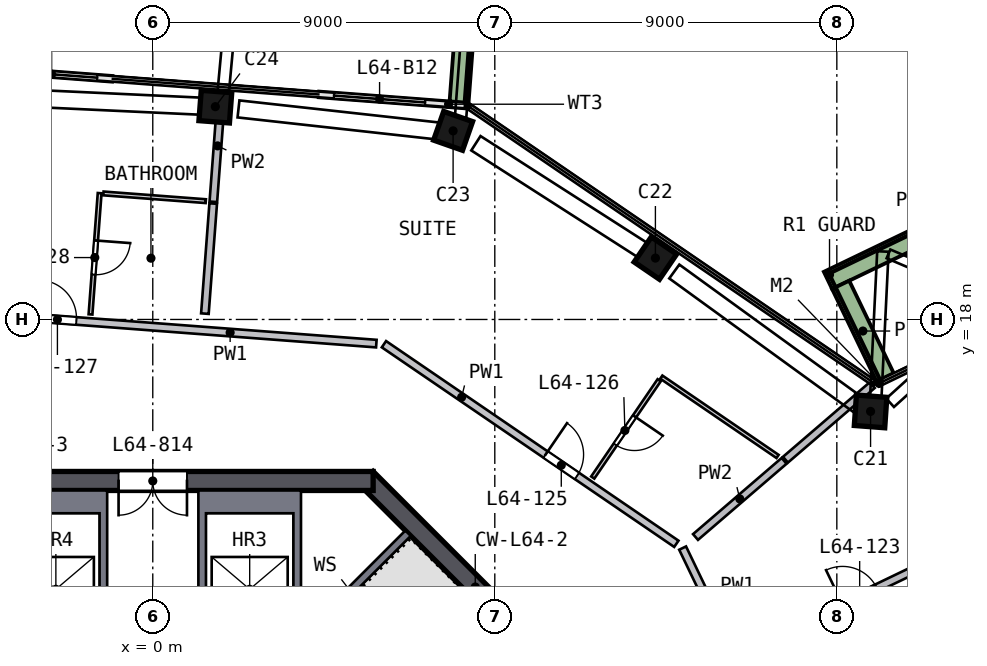
"""IFC4 building model, lengths in metres.
Left out: names, types, materials, properties, quantities, classifications, styles, units other than length and angle.
Written with IfcOpenShell. Run it as: python <this file> out.ifc"""

import sys

from ifc_helpers import new_model, si_unit, direction, frame, frame_2d, origin, origin_2d, place, context, subcontext, project, spatial, polyline, rectangle, outline, extrude, element, fill, save


model = new_model("IFC4")
c1 = context("Model", 3, precision=1e-05, world=origin(), true_north=direction((0.0, 1.0)))
c2 = subcontext(c1, "Body", "Model", "MODEL_VIEW")
j1 = project(units=[si_unit("LENGTHUNIT", "METRE"), si_unit("PLANEANGLEUNIT", "RADIAN")], contexts=[c1])
p1 = place(None, origin())
s1 = spatial("IfcSite", under=j1, at=p1, CompositionType="ELEMENT")
p2 = place(p1, origin())
s2 = spatial("IfcBuilding", under=s1, at=p2, CompositionType="ELEMENT")
p3 = place(p2, frame((0.0, 0.0, 259.5)))
s3 = spatial("IfcBuildingStorey", under=s2, at=p3, CompositionType="ELEMENT", Elevation=259.5)
p4 = place(p3, frame((18.978, 15.472, 0.0), z_axis=(-0.074360285, 0.089636475, 0.99319477), x_axis=(0.994413734, -0.068151324, 0.08060225)))
e1 = element("IfcColumn", 1, at=p4, inside=s3, PredefinedType="COLUMN", context=c2, shape_type="SweptSolid", body=[
    extrude(rectangle(XDim=0.8, YDim=0.8, at=origin_2d()), origin(), (0.0, 0.0, 1.0), 3.021),
])
p5 = place(p3, frame((13.339, 19.54, 0.0), z_axis=(-0.093477865, 0.062668984, 0.993647064), x_axis=(-0.820609145, 0.560299936, -0.11253716)))
e2 = element("IfcColumn", 2, at=p5, inside=s3, PredefinedType="COLUMN", context=c2, shape_type="SweptSolid", body=[
    extrude(rectangle(XDim=0.8, YDim=0.8, at=origin_2d()), origin(), (0.0, 0.0, 1.0), 3.019),
])
p6 = place(p3, frame((8.035, 22.918, 0.0), z_axis=(-0.109369959, 0.037265005, 0.993302336), x_axis=(0.937470498, -0.328328413, 0.115540119)))
e3 = element("IfcColumn", 3, at=p6, inside=s3, PredefinedType="COLUMN", context=c2, shape_type="SweptSolid", body=[
    extrude(rectangle(XDim=0.8, YDim=0.8, at=origin_2d()), origin(), (0.0, 0.0, 1.0), 3.02),
])
p7 = place(p3, frame((1.782, 23.591, 0.0), z_axis=(-0.112238709, 0.007601181, 0.9936522), x_axis=(-0.990776389, 0.075549588, -0.112491804)))
e4 = element("IfcColumn", 4, at=p7, inside=s3, PredefinedType="COLUMN", context=c2, shape_type="SweptSolid", body=[
    extrude(rectangle(XDim=0.8, YDim=0.8, at=origin_2d()), origin(), (0.0, 0.0, 1.0), 3.019),
])
p8 = place(p3, frame((13.823, 5.622, 0.0), z_axis=(0.0, 0.0, 1.0), x_axis=(-0.707106781, 0.707106781, 0.0)))
e5 = element("IfcWall", 5, at=p8, inside=s3, PredefinedType="SHEAR", context=c2, shape_type="SweptSolid", body=[
    extrude(rectangle(XDim=11.598, YDim=0.5, at=frame_2d((5.799, 0.0))), origin(), (0.0, 0.0, 1.0), 3.5),
])
p9 = place(p8, frame((2.099, 0.0, 0.0)))
e6 = element("IfcOpeningElement", 6, at=p9, cuts=e5, PredefinedType="OPENING", context=c2, shape_type="SweptSolid", body=[
    extrude(rectangle(XDim=1.2, YDim=2.1, at=frame_2d((0.6, 1.05))), frame((0.0, 0.26, 0.0), z_axis=(0.0, -1.0, 0.0), x_axis=(1.0, 0.0, 0.0)), (0.0, 0.0, 1.0), 0.52),
])
p10 = place(p3, frame((5.799, 13.75, 0.0), z_axis=(0.0, 0.0, 1.0), x_axis=(-1.0, 0.0, 0.0)))
e7 = element("IfcWall", 7, at=p10, inside=s3, PredefinedType="SHEAR", context=c2, shape_type="SweptSolid", body=[
    extrude(rectangle(XDim=11.598, YDim=0.5, at=frame_2d((5.799, 0.0))), origin(), (0.0, 0.0, 1.0), 3.5),
])
p11 = place(p10, frame((4.899, 0.0, 0.0)))
e8 = element("IfcOpeningElement", 8, at=p11, cuts=e7, PredefinedType="OPENING", context=c2, shape_type="SweptSolid", body=[
    extrude(rectangle(XDim=1.8, YDim=2.1, at=frame_2d((0.9, 1.05))), frame((0.0, 0.26, 0.0), z_axis=(0.0, -1.0, 0.0), x_axis=(1.0, 0.0, 0.0)), (0.0, 0.0, 1.0), 0.52),
])
p12 = place(p3, frame((8.203, 23.633, 0.0), z_axis=(0.0, 0.0, 1.0), x_axis=(-0.99716043, 0.075306552, 0.0)))
e9 = element("IfcWall", 9, at=p12, inside=s3, PredefinedType="SOLIDWALL", context=c2, shape_type="SweptSolid", body=[
    extrude(rectangle(XDim=3.842, YDim=0.15, at=frame_2d((1.921, 0.0))), origin(), (0.0, 0.0, 1.0), 2.935),
])
p13 = place(p12, frame((1.042, 0.0, 0.0)))
e10 = element("IfcOpeningElement", 10, at=p13, cuts=e9, PredefinedType="OPENING", context=c2, shape_type="SweptSolid", body=[
    extrude(rectangle(XDim=2.4, YDim=2.4, at=frame_2d((1.2, 1.2))), frame((0.0, 0.085, 0.0), z_axis=(0.0, -1.0, 0.0), x_axis=(1.0, 0.0, 0.0)), (0.0, 0.0, 1.0), 0.17),
])
p14 = place(p3, frame((-1.066, 24.333, 0.0), z_axis=(0.0, 0.0, 1.0), x_axis=(-0.997159679, 0.075316491, 0.0)))
e11 = element("IfcWall", 11, at=p14, inside=s3, PredefinedType="SOLIDWALL", context=c2, shape_type="SweptSolid", body=[
    extrude(rectangle(XDim=3.504, YDim=0.15, at=frame_2d((1.752, 0.0))), origin(), (0.0, 0.0, 1.0), 2.935),
])
p15 = place(p14, frame((0.4, 0.0, 0.0)))
e12 = element("IfcOpeningElement", 12, at=p15, cuts=e11, PredefinedType="OPENING", context=c2, shape_type="SweptSolid", body=[
    extrude(rectangle(XDim=2.4, YDim=2.4, at=frame_2d((1.2, 1.2))), frame((0.0, 0.085, 0.0), z_axis=(0.0, -1.0, 0.0), x_axis=(1.0, 0.0, 0.0)), (0.0, 0.0, 1.0), 0.17),
])
p16 = place(p3, frame((23.174, 21.629, 0.0), z_axis=(0.0, 0.0, 1.0), x_axis=(-0.901221864, -0.433357994, 0.0)))
e13 = element("IfcWall", 13, at=p16, inside=s3, PredefinedType="SOLIDWALL", context=c2, shape_type="SweptSolid", body=[
    extrude(rectangle(XDim=6.0, YDim=0.5, at=frame_2d((3.0, 0.0))), origin(), (0.0, 0.0, 1.0), 0.7),
])
p17 = place(p3, frame((18.101, 18.912, 0.0), z_axis=(0.0, 0.0, 1.0), x_axis=(0.433374971, -0.901213701, 0.0)))
e14 = element("IfcWall", 14, at=p17, inside=s3, PredefinedType="SOLIDWALL", context=c2, shape_type="SweptSolid", body=[
    extrude(rectangle(XDim=2.699, YDim=0.5, at=frame_2d((1.35, 0.0))), origin(), (0.0, 0.0, 1.0), 0.7),
])
p18 = place(p3, frame((8.06, 23.72, 0.0), z_axis=(0.0, 0.0, 1.0), x_axis=(0.075330696, 0.997158606, 0.0)))
e15 = element("IfcWall", 15, at=p18, inside=s3, PredefinedType="SOLIDWALL", context=c2, shape_type="SweptSolid", body=[
    extrude(rectangle(XDim=3.199, YDim=0.5, at=frame_2d((1.599, 0.0))), origin(), (0.0, 0.0, 1.0), 0.7),
])
p19 = place(p3, origin())
e16 = element("IfcWall", 16, at=p19, inside=s3, PredefinedType="SOLIDWALL", context=c2, shape_type="SweptSolid", body=[
    extrude(outline(polyline([(3.9, 9.9), (3.7, 9.9), (3.7, 12.9), (1.4, 12.9), (1.4, 9.9), (1.2, 9.9), (1.2, 13.5), (3.9, 13.5), (3.9, 9.9)])), origin(), (0.0, 0.0, 1.0), 3.0),
])
p20 = place(p3, origin())
e17 = element("IfcWall", 17, at=p20, inside=s3, PredefinedType="SOLIDWALL", context=c2, shape_type="SweptSolid", body=[
    extrude(outline(polyline([(-3.9, 13.5), (-1.2, 13.5), (-1.2, 9.9), (-1.4, 9.9), (-1.4, 12.9), (-3.7, 12.9), (-3.7, 9.9), (-3.9, 9.9), (-3.9, 13.5)])), origin(), (0.0, 0.0, 1.0), 3.0),
])
p21 = place(p3, frame((3.677, 9.334, 0.0), z_axis=(0.0, 0.0, 1.0), x_axis=(0.707078393, 0.707135168, 0.0)))
e18 = element("IfcWall", 18, at=p21, inside=s3, PredefinedType="SOLIDWALL", context=c2, shape_type="SweptSolid", body=[
    extrude(rectangle(XDim=4.3, YDim=0.2, at=frame_2d((2.15, 0.0))), origin(), (0.0, 0.0, 1.0), 3.0),
])
p22 = place(p3, frame((-3.207, 18.051, 0.0), z_axis=(0.0, 0.0, 1.0), x_axis=(0.997158012, -0.075338566, 0.0)))
e19 = element("IfcWall", 19, at=p22, inside=s3, PredefinedType="SOLIDWALL", context=c2, shape_type="SweptSolid", body=[
    extrude(rectangle(XDim=9.116, YDim=0.2, at=frame_2d((4.558, 0.0))), origin(), (0.0, 0.0, 1.0), 3.0),
])
p23 = place(p22, frame((0.2, 0.0, 0.0)))
e20 = element("IfcOpeningElement", 20, at=p23, cuts=e19, PredefinedType="OPENING", context=c2, shape_type="SweptSolid", body=[
    extrude(rectangle(XDim=1.0, YDim=2.1, at=frame_2d((0.5, 1.05))), frame((0.0, 0.11, 0.0), z_axis=(0.0, -1.0, 0.0), x_axis=(1.0, 0.0, 0.0)), (0.0, 0.0, 1.0), 0.22),
])
p24 = place(p3, frame((6.083, 17.349, 0.0), z_axis=(0.0, 0.0, 1.0), x_axis=(0.825903966, -0.563810818, 0.0)))
e21 = element("IfcWall", 21, at=p24, inside=s3, PredefinedType="SOLIDWALL", context=c2, shape_type="SweptSolid", body=[
    extrude(rectangle(XDim=9.316, YDim=0.2, at=frame_2d((4.658, 0.0))), origin(), (0.0, 0.0, 1.0), 3.0),
])
p25 = place(p24, frame((5.15, 0.0, 0.0)))
e22 = element("IfcOpeningElement", 22, at=p25, cuts=e21, PredefinedType="OPENING", context=c2, shape_type="SweptSolid", body=[
    extrude(rectangle(XDim=1.0, YDim=2.1, at=frame_2d((0.5, 1.05))), frame((0.0, 0.11, 0.0), z_axis=(0.0, -1.0, 0.0), x_axis=(1.0, 0.0, 0.0)), (0.0, 0.0, 1.0), 0.22),
])
p26 = place(p3, frame((13.942, 11.984, 0.0), z_axis=(0.0, 0.0, 1.0), x_axis=(0.433338112, -0.901231424, 0.0)))
e23 = element("IfcWall", 23, at=p26, inside=s3, PredefinedType="SOLIDWALL", context=c2, shape_type="SweptSolid", body=[
    extrude(rectangle(XDim=9.517, YDim=0.2, at=frame_2d((4.758, 0.0))), origin(), (0.0, 0.0, 1.0), 3.0),
])
p27 = place(p26, frame((3.859, 0.0, 0.0)))
e24 = element("IfcOpeningElement", 24, at=p27, cuts=e23, PredefinedType="OPENING", context=c2, shape_type="SweptSolid", body=[
    extrude(rectangle(XDim=1.8, YDim=2.1, at=frame_2d((0.9, 1.05))), frame((0.0, 0.11, 0.0), z_axis=(0.0, -1.0, 0.0), x_axis=(1.0, 0.0, 0.0)), (0.0, 0.0, 1.0), 0.22),
])
p28 = place(p3, frame((1.371, 18.154, 0.0), z_axis=(0.0, 0.0, 1.0), x_axis=(0.075308129, 0.997160311, 0.0)))
e25 = element("IfcWall", 25, at=p28, inside=s3, PredefinedType="SOLIDWALL", context=c2, shape_type="SweptSolid", body=[
    extrude(rectangle(XDim=2.905, YDim=0.2, at=frame_2d((1.452, 0.0))), origin(), (0.0, 0.0, 1.0), 3.0),
])
p29 = place(p3, frame((1.594, 21.096, 0.0), z_axis=(0.0, 0.0, 1.0), x_axis=(0.075343008, 0.997157676, 0.0)))
e26 = element("IfcWall", 26, at=p29, inside=s3, PredefinedType="SOLIDWALL", context=c2, shape_type="SweptSolid", body=[
    extrude(rectangle(XDim=2.952, YDim=0.2, at=frame_2d((1.476, 0.0))), origin(), (0.0, 0.0, 1.0), 3.0),
])
p30 = place(p3, frame((14.281, 12.275, 0.0), z_axis=(0.0, 0.0, 1.0), x_axis=(0.758375939, 0.65181741, 0.0)))
e27 = element("IfcWall", 27, at=p30, inside=s3, PredefinedType="SOLIDWALL", context=c2, shape_type="SweptSolid", body=[
    extrude(rectangle(XDim=3.075, YDim=0.2, at=frame_2d((1.537, 0.0))), origin(), (0.0, 0.0, 1.0), 3.0),
])
p31 = place(p3, frame((16.648, 14.31, 0.0), z_axis=(0.0, 0.0, 1.0), x_axis=(0.758397568, 0.651792244, 0.0)))
e28 = element("IfcWall", 28, at=p31, inside=s3, PredefinedType="SOLIDWALL", context=c2, shape_type="SweptSolid", body=[
    extrude(rectangle(XDim=3.011, YDim=0.2, at=frame_2d((1.506, 0.0))), origin(), (0.0, 0.0, 1.0), 3.0),
])
p32 = place(p3, frame((15.492, 9.223, 0.0), z_axis=(0.0, 0.0, 1.0), x_axis=(0.901221811, 0.433358105, 0.0)))
e29 = element("IfcWall", 29, at=p32, inside=s3, PredefinedType="SOLIDWALL", context=c2, shape_type="SweptSolid", body=[
    extrude(rectangle(XDim=10.302, YDim=0.2, at=frame_2d((5.151, 0.0))), origin(), (0.0, 0.0, 1.0), 3.0),
])
p33 = place(p32, frame((2.95, 0.0, 0.0)))
e30 = element("IfcOpeningElement", 30, at=p33, cuts=e29, PredefinedType="OPENING", context=c2, shape_type="SweptSolid", body=[
    extrude(rectangle(XDim=1.0, YDim=2.1, at=frame_2d((0.5, 1.05))), frame((0.0, 0.11, 0.0), z_axis=(0.0, -1.0, 0.0), x_axis=(1.0, 0.0, 0.0)), (0.0, 0.0, 1.0), 0.22),
])
p34 = place(p3, frame((-1.398, 21.324, 0.0), z_axis=(0.0, 0.0, 1.0), x_axis=(-0.075302041, -0.997160771, 0.0)))
e31 = element("IfcWall", 31, at=p34, inside=s3, PredefinedType="PARTITIONING", context=c2, shape_type="SweptSolid", body=[
    extrude(rectangle(XDim=3.2, YDim=0.1, at=frame_2d((1.6, 0.0))), origin(), (0.0, 0.0, 1.0), 3.0),
])
p35 = place(p34, frame((1.25, 0.0, 0.0)))
e32 = element("IfcOpeningElement", 32, at=p35, cuts=e31, PredefinedType="OPENING", context=c2, shape_type="SweptSolid", body=[
    extrude(rectangle(XDim=0.9, YDim=2.1, at=frame_2d((0.45, 1.05))), frame((0.0, 0.06, 0.0), z_axis=(0.0, -1.0, 0.0), x_axis=(1.0, 0.0, 0.0)), (0.0, 0.0, 1.0), 0.12),
])
p36 = place(p3, frame((-1.298, 21.317, 0.0), z_axis=(0.0, 0.0, 1.0), x_axis=(0.997159381, -0.075320436, 0.0)))
e33 = element("IfcWall", 33, at=p36, inside=s3, PredefinedType="PARTITIONING", context=c2, shape_type="SweptSolid", body=[
    extrude(rectangle(XDim=2.7, YDim=0.1, at=frame_2d((1.35, 0.0))), origin(), (0.0, 0.0, 1.0), 3.0),
])
p37 = place(p3, frame((13.325, 16.401, 0.0), z_axis=(0.0, 0.0, 1.0), x_axis=(-0.563808375, -0.825905634, 0.0)))
e34 = element("IfcWall", 34, at=p37, inside=s3, PredefinedType="PARTITIONING", context=c2, shape_type="SweptSolid", body=[
    extrude(rectangle(XDim=3.1, YDim=0.1, at=frame_2d((1.55, 0.0))), origin(), (0.0, 0.0, 1.0), 3.0),
])
p38 = place(p37, frame((1.15, 0.0, 0.0)))
e35 = element("IfcOpeningElement", 35, at=p38, cuts=e34, PredefinedType="OPENING", context=c2, shape_type="SweptSolid", body=[
    extrude(rectangle(XDim=0.9, YDim=2.1, at=frame_2d((0.45, 1.05))), frame((0.0, 0.06, 0.0), z_axis=(0.0, -1.0, 0.0), x_axis=(1.0, 0.0, 0.0)), (0.0, 0.0, 1.0), 0.12),
])
p39 = place(p3, frame((13.382, 16.483, 0.0), z_axis=(0.0, 0.0, 1.0), x_axis=(0.825895308, -0.563823501, 0.0)))
e36 = element("IfcWall", 36, at=p39, inside=s3, PredefinedType="PARTITIONING", context=c2, shape_type="SweptSolid", body=[
    extrude(rectangle(XDim=3.704, YDim=0.1, at=frame_2d((1.852, 0.0))), origin(), (0.0, 0.0, 1.0), 3.0),
])
p40 = place(p13, origin())
e37 = element("IfcDoor", 37, at=p40, inside=s3, OperationType="SLIDING_TO_LEFT", PredefinedType="DOOR", context=c2, shape_type="SweptSolid", body=[
    extrude(rectangle(XDim=2.4, YDim=2.4, at=frame_2d((1.2, 1.2))), frame((0.0, 0.025, 0.0), z_axis=(0.0, -1.0, 0.0), x_axis=(1.0, 0.0, 0.0)), (0.0, 0.0, 1.0), 0.05),
])
fill(e10, e37)
p41 = place(p15, origin())
e38 = element("IfcDoor", 38, at=p41, inside=s3, OperationType="SLIDING_TO_RIGHT", PredefinedType="DOOR", context=c2, shape_type="SweptSolid", body=[
    extrude(rectangle(XDim=2.4, YDim=2.4, at=frame_2d((1.2, 1.2))), frame((0.0, 0.025, 0.0), z_axis=(0.0, -1.0, 0.0), x_axis=(1.0, 0.0, 0.0)), (0.0, 0.0, 1.0), 0.05),
])
fill(e12, e38)
p42 = place(p11, origin())
e39 = element("IfcDoor", 39, at=p42, inside=s3, OperationType="DOUBLE_DOOR_SINGLE_SWING", PredefinedType="DOOR", context=c2, shape_type="SweptSolid", body=[
    extrude(rectangle(XDim=1.8, YDim=2.1, at=frame_2d((0.9, 1.05))), frame((0.0, 0.025, 0.0), z_axis=(0.0, -1.0, 0.0), x_axis=(1.0, 0.0, 0.0)), (0.0, 0.0, 1.0), 0.05),
])
fill(e8, e39)
p43 = place(p25, origin())
e40 = element("IfcDoor", 40, at=p43, inside=s3, OperationType="SINGLE_SWING_LEFT", PredefinedType="DOOR", context=c2, shape_type="SweptSolid", body=[
    extrude(rectangle(XDim=1.0, YDim=2.1, at=frame_2d((0.5, 1.05))), frame((0.0, 0.025, 0.0), z_axis=(0.0, -1.0, 0.0), x_axis=(1.0, 0.0, 0.0)), (0.0, 0.0, 1.0), 0.05),
])
fill(e22, e40)
p44 = place(p38, origin())
e41 = element("IfcDoor", 41, at=p44, inside=s3, OperationType="SINGLE_SWING_LEFT", PredefinedType="DOOR", context=c2, shape_type="SweptSolid", body=[
    extrude(rectangle(XDim=0.9, YDim=2.1, at=frame_2d((0.45, 1.05))), frame((0.0, 0.025, 0.0), z_axis=(0.0, -1.0, 0.0), x_axis=(1.0, 0.0, 0.0)), (0.0, 0.0, 1.0), 0.05),
])
fill(e35, e41)
p45 = place(p23, origin())
e42 = element("IfcDoor", 42, at=p45, inside=s3, OperationType="SINGLE_SWING_LEFT", PredefinedType="DOOR", context=c2, shape_type="SweptSolid", body=[
    extrude(rectangle(XDim=1.0, YDim=2.1, at=frame_2d((0.5, 1.05))), frame((0.0, 0.025, 0.0), z_axis=(0.0, -1.0, 0.0), x_axis=(1.0, 0.0, 0.0)), (0.0, 0.0, 1.0), 0.05),
])
fill(e20, e42)
p46 = place(p35, origin())
e43 = element("IfcDoor", 43, at=p46, inside=s3, OperationType="SINGLE_SWING_LEFT", PredefinedType="DOOR", context=c2, shape_type="SweptSolid", body=[
    extrude(rectangle(XDim=0.9, YDim=2.1, at=frame_2d((0.45, 1.05))), frame((0.0, 0.025, 0.0), z_axis=(0.0, -1.0, 0.0), x_axis=(1.0, 0.0, 0.0)), (0.0, 0.0, 1.0), 0.05),
])
fill(e32, e43)
save(model, sys.argv[1])
